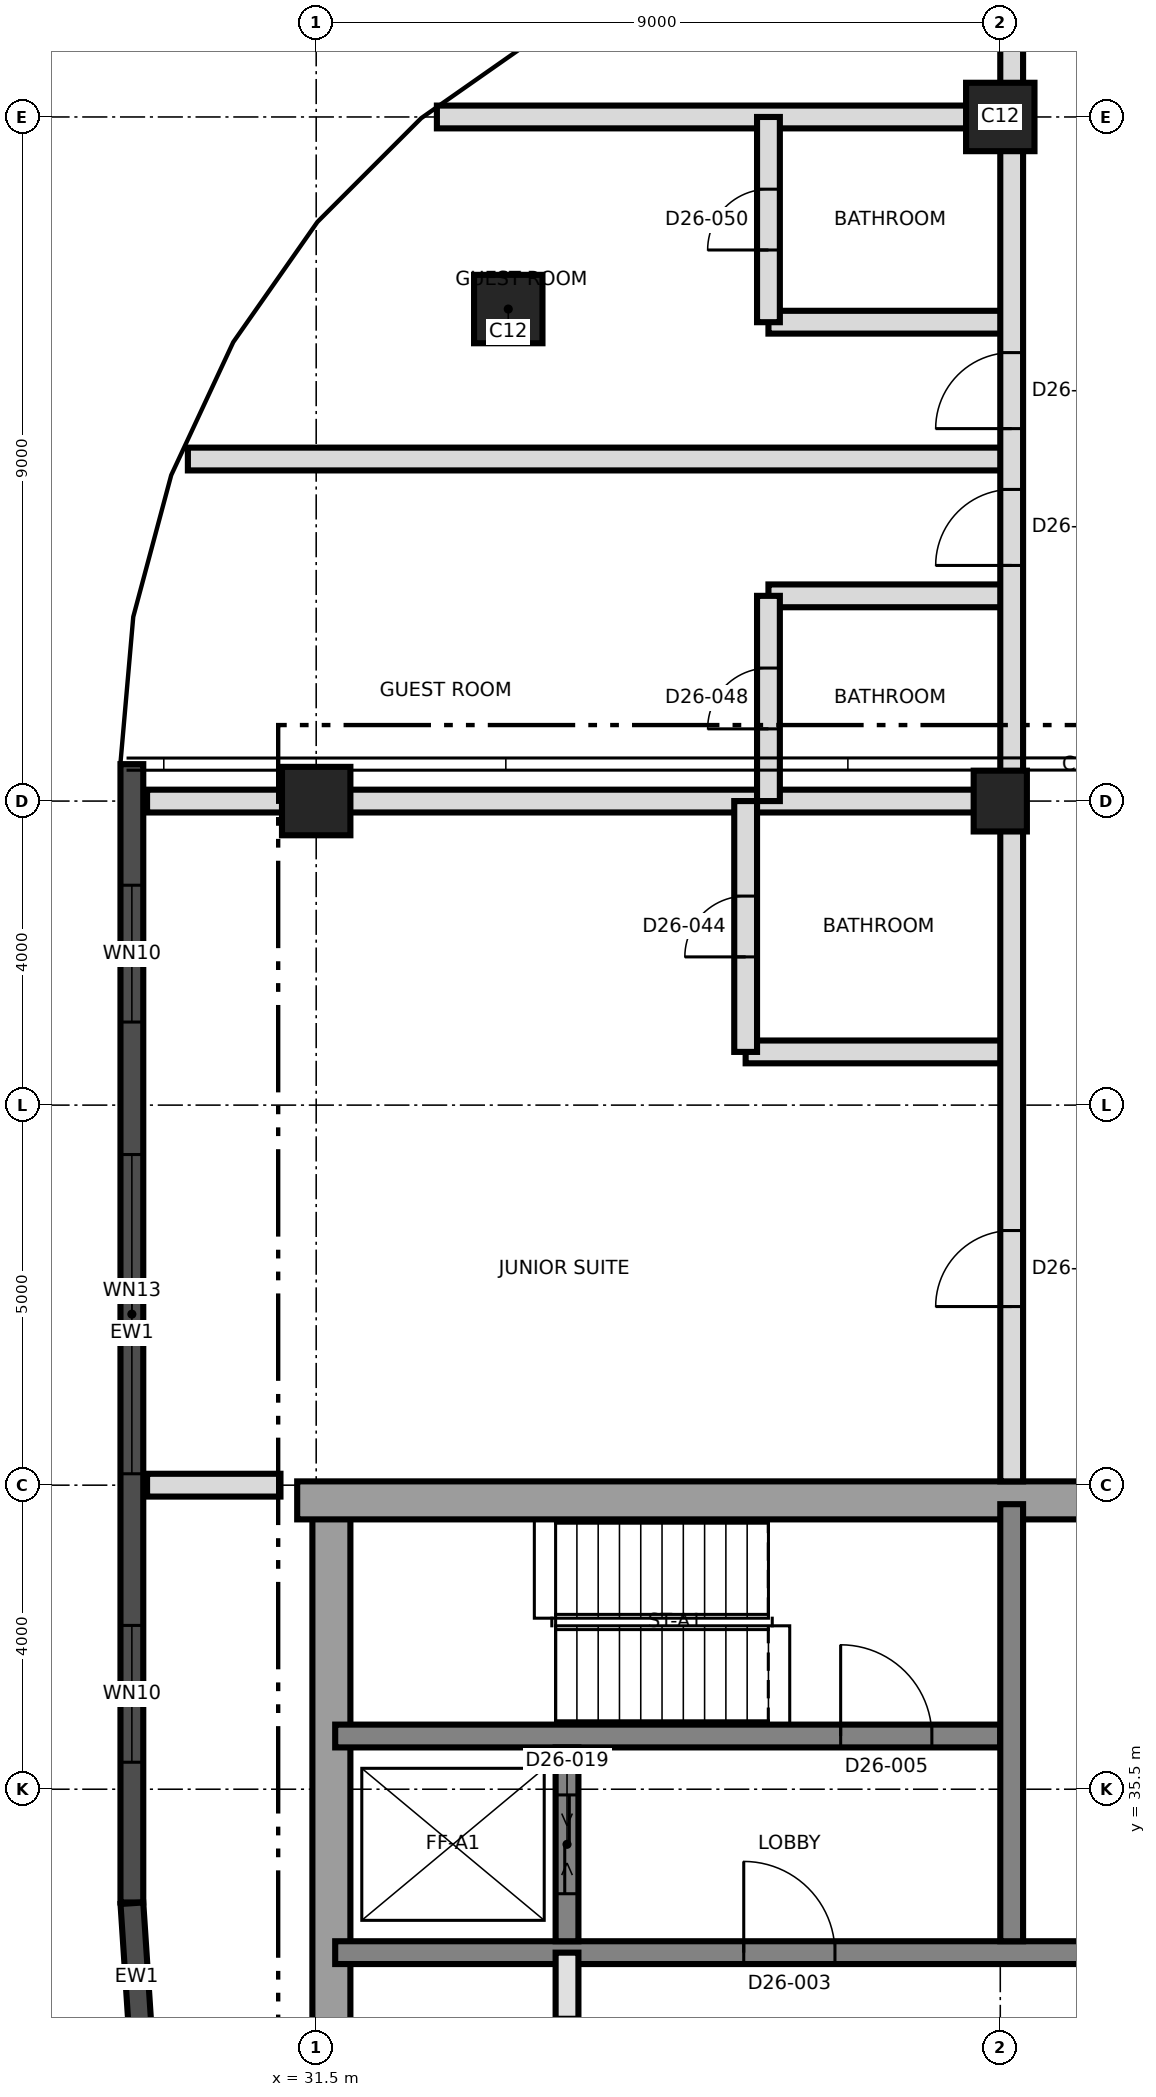
"""IFC4 building model, lengths in metres.
Left out: names, types, materials, properties, quantities, classifications, styles, units other than length and angle.
Written with IfcOpenShell. Run it as: python <this file> out.ifc"""

import sys

from ifc_helpers import new_model, si_unit, direction, frame, frame_2d, origin, origin_2d, place, context, subcontext, project, spatial, rectangle, extrude, element, fill, save


model = new_model("IFC4")
c1 = context("Model", 3, precision=1e-05, world=origin(), true_north=direction((0.0, 1.0)))
c2 = subcontext(c1, "Body", "Model", "MODEL_VIEW")
j1 = project(units=[si_unit("LENGTHUNIT", "METRE"), si_unit("PLANEANGLEUNIT", "RADIAN")], contexts=[c1])
p1 = place(None, origin())
s1 = spatial("IfcSite", under=j1, at=p1, CompositionType="ELEMENT")
p2 = place(p1, origin())
s2 = spatial("IfcBuilding", under=s1, at=p2, CompositionType="ELEMENT")
p3 = place(p2, frame((0.0, 0.0, 240.2)))
s3 = spatial("IfcBuildingStorey", under=s2, at=p3, CompositionType="ELEMENT", Elevation=240.2)
p4 = place(p3, frame((31.7, 21.75, 0.0), z_axis=(0.0, 0.0, 1.0), x_axis=(0.0, 1.0, 0.0)))
e1 = element("IfcWall", 1, at=p4, inside=s3, PredefinedType="SHEAR", context=c2, shape_type="SweptSolid", body=[
    extrude(rectangle(XDim=17.5, YDim=0.5, at=frame_2d((8.75, 0.0))), origin(), (0.0, 0.0, 1.0), 3.7),
])
p5 = place(p3, frame((31.25, 39.3, 0.0), z_axis=(0.0, 0.0, 1.0), x_axis=(1.0, 0.0, 0.0)))
e2 = element("IfcWall", 2, at=p5, inside=s3, PredefinedType="SHEAR", context=c2, shape_type="SweptSolid", body=[
    extrude(rectangle(XDim=27.0, YDim=0.5, at=frame_2d((13.5, 0.0))), origin(), (0.0, 0.0, 1.0), 3.7),
])
p6 = place(p5, frame((10.45, 0.0, 0.0)))
e3 = element("IfcOpeningElement", 3, at=p6, cuts=e2, PredefinedType="OPENING", context=c2, shape_type="SweptSolid", body=[
    extrude(rectangle(XDim=1.2, YDim=2.1, at=frame_2d((0.6, 1.05))), frame((0.0, 0.26, 0.0), z_axis=(0.0, -1.0, 0.0), x_axis=(1.0, 0.0, 0.0)), (0.0, 0.0, 1.0), 0.52),
])
p7 = place(p3, frame((31.75, 33.35, 0.0), z_axis=(0.0, 0.0, 1.0), x_axis=(1.0, 0.0, 0.0)))
e4 = element("IfcWall", 4, at=p7, inside=s3, PredefinedType="SHEAR", context=c2, shape_type="SweptSolid", body=[
    extrude(rectangle(XDim=26.5, YDim=0.3, at=frame_2d((13.25, 0.0))), origin(), (0.0, 0.0, 1.0), 3.7),
])
p8 = place(p7, frame((13.9, 0.0, 0.0)))
e5 = element("IfcOpeningElement", 5, at=p8, cuts=e4, PredefinedType="OPENING", context=c2, shape_type="SweptSolid", body=[
    extrude(rectangle(XDim=1.4, YDim=2.1, at=frame_2d((0.7, 1.05))), frame((0.0, 0.16, 0.0), z_axis=(0.0, -1.0, 0.0), x_axis=(1.0, 0.0, 0.0)), (0.0, 0.0, 1.0), 0.32),
])
p9 = place(p7, frame((5.375, 0.0, 0.0)))
e6 = element("IfcOpeningElement", 6, at=p9, cuts=e4, PredefinedType="OPENING", context=c2, shape_type="SweptSolid", body=[
    extrude(rectangle(XDim=1.2, YDim=2.1, at=frame_2d((0.6, 1.05))), frame((0.0, 0.16, 0.0), z_axis=(0.0, -1.0, 0.0), x_axis=(1.0, 0.0, 0.0)), (0.0, 0.0, 1.0), 0.32),
])
p10 = place(p7, frame((19.925, 0.0, 0.0)))
e7 = element("IfcOpeningElement", 7, at=p10, cuts=e4, PredefinedType="OPENING", context=c2, shape_type="SweptSolid", body=[
    extrude(rectangle(XDim=1.2, YDim=2.1, at=frame_2d((0.6, 1.05))), frame((0.0, 0.16, 0.0), z_axis=(0.0, -1.0, 0.0), x_axis=(1.0, 0.0, 0.0)), (0.0, 0.0, 1.0), 0.32),
])
p11 = place(p3, frame((31.75, 36.2, 0.0), z_axis=(0.0, 0.0, 1.0), x_axis=(1.0, 0.0, 0.0)))
e8 = element("IfcWall", 8, at=p11, inside=s3, PredefinedType="SHEAR", context=c2, shape_type="SweptSolid", body=[
    extrude(rectangle(XDim=8.75, YDim=0.3, at=frame_2d((4.375, 0.0))), origin(), (0.0, 0.0, 1.0), 3.7),
])
p12 = place(p11, frame((6.65, 0.0, 0.0)))
e9 = element("IfcOpeningElement", 9, at=p12, cuts=e8, PredefinedType="OPENING", context=c2, shape_type="SweptSolid", body=[
    extrude(rectangle(XDim=1.2, YDim=2.1, at=frame_2d((0.6, 1.05))), frame((0.0, 0.16, 0.0), z_axis=(0.0, -1.0, 0.0), x_axis=(1.0, 0.0, 0.0)), (0.0, 0.0, 1.0), 0.32),
])
p13 = place(p3, frame((40.65, 33.5, 0.0), z_axis=(0.0, 0.0, 1.0), x_axis=(0.0, 1.0, 0.0)))
e10 = element("IfcWall", 10, at=p13, inside=s3, PredefinedType="SHEAR", context=c2, shape_type="SweptSolid", body=[
    extrude(rectangle(XDim=5.75, YDim=0.3, at=frame_2d((2.875, 0.0))), origin(), (0.0, 0.0, 1.0), 3.7),
])
p14 = place(p3, frame((34.8, 33.5, 0.0), z_axis=(0.0, 0.0, 1.0), x_axis=(0.0, 1.0, 0.0)))
e11 = element("IfcWall", 11, at=p14, inside=s3, PredefinedType="SHEAR", context=c2, shape_type="SweptSolid", body=[
    extrude(rectangle(XDim=2.55, YDim=0.3, at=frame_2d((1.275, 0.0))), origin(), (0.0, 0.0, 1.0), 3.7),
])
p15 = place(p14, frame((0.625, 0.0, 0.0)))
e12 = element("IfcOpeningElement", 12, at=p15, cuts=e11, PredefinedType="OPENING", context=c2, shape_type="SweptSolid", body=[
    extrude(rectangle(XDim=1.3, YDim=2.4, at=frame_2d((0.65, 1.2))), frame((0.0, 0.16, 0.0), z_axis=(0.0, -1.0, 0.0), x_axis=(1.0, 0.0, 0.0)), (0.0, 0.0, 1.0), 0.32),
])
p16 = place(p3, frame((31.5, 48.5, 0.0), z_axis=(0.0, 0.0, 1.0), x_axis=(1.0, 0.0, 0.0)))
e13 = element("IfcColumn", 13, at=p16, inside=s3, PredefinedType="COLUMN", context=c2, shape_type="SweptSolid", body=[
    extrude(rectangle(XDim=0.9, YDim=0.9, at=origin_2d()), origin(), (0.0, 0.0, 1.0), 3.7),
])
p17 = place(p3, frame((40.5, 48.5, 0.0), z_axis=(0.0, 0.0, 1.0), x_axis=(0.0, 1.0, 0.0)))
e14 = element("IfcColumn", 14, at=p17, inside=s3, PredefinedType="COLUMN", context=c2, shape_type="SweptSolid", body=[
    extrude(rectangle(XDim=0.8, YDim=0.7, at=origin_2d()), origin(), (0.0, 0.0, 1.0), 3.7),
])
for number, where, z_axis, x_axis in (
    (15, (34.027, 54.973, 0.0), (0.0, 0.0, 1.0), (1.0, 0.0, 0.0)),
    (16, (40.5, 57.5, 0.0), (0.0, 0.0, 1.0), (1.0, 0.0, 0.0)),
):
    element("IfcColumn", number, at=place(p3, frame(where, z_axis=z_axis, x_axis=x_axis)), inside=s3, PredefinedType="COLUMN", context=c2, shape_type="SweptSolid", body=[
        extrude(rectangle(XDim=0.9, YDim=0.9, at=origin_2d()), origin(), (0.0, 0.0, 1.0), 3.7),
    ])
p18 = place(p3, frame((29.075, 48.986, 0.0), z_axis=(0.0, 0.0, 1.0), x_axis=(0.0, -1.0, 0.0)))
e17 = element("IfcWall", 17, at=p18, inside=s3, PredefinedType="SOLIDWALL", context=c2, shape_type="SweptSolid", body=[
    extrude(rectangle(XDim=14.976, YDim=0.3, at=frame_2d((7.488, 0.0))), origin(), (0.0, 0.0, 1.0), 3.4),
])
p19 = place(p18, frame((1.593, 0.0, 0.3)))
e18 = element("IfcOpeningElement", 18, at=p19, cuts=e17, PredefinedType="OPENING", context=c2, shape_type="SweptSolid", body=[
    extrude(rectangle(XDim=1.8, YDim=2.4, at=frame_2d((0.9, 1.2))), frame((0.0, 0.16, 0.0), z_axis=(0.0, -1.0, 0.0), x_axis=(1.0, 0.0, 0.0)), (0.0, 0.0, 1.0), 0.32),
])
p20 = place(p18, frame((5.136, 0.0, 0.9)))
e19 = element("IfcOpeningElement", 19, at=p20, cuts=e17, PredefinedType="OPENING", context=c2, shape_type="SweptSolid", body=[
    extrude(rectangle(XDim=4.2, YDim=1.7, at=frame_2d((2.1, 0.85))), frame((0.0, 0.16, 0.0), z_axis=(0.0, -1.0, 0.0), x_axis=(1.0, 0.0, 0.0)), (0.0, 0.0, 1.0), 0.32),
])
p21 = place(p18, frame((11.331, 0.0, 0.3)))
e20 = element("IfcOpeningElement", 20, at=p21, cuts=e17, PredefinedType="OPENING", context=c2, shape_type="SweptSolid", body=[
    extrude(rectangle(XDim=1.8, YDim=2.4, at=frame_2d((0.9, 1.2))), frame((0.0, 0.16, 0.0), z_axis=(0.0, -1.0, 0.0), x_axis=(1.0, 0.0, 0.0)), (0.0, 0.0, 1.0), 0.32),
])
p22 = place(p3, frame((29.075, 34.0, 0.0), z_axis=(0.0, 0.0, 1.0), x_axis=(0.065359381612, -0.997861789646, 0.0)))
e21 = element("IfcWall", 21, at=p22, inside=s3, PredefinedType="SOLIDWALL", context=c2, shape_type="SweptSolid", body=[
    extrude(rectangle(XDim=1.942, YDim=0.3, at=frame_2d((0.971, 0.0))), origin(), (0.0, 0.0, 1.0), 3.4),
])
p23 = place(p3, frame((34.8, 30.65, 0.0), z_axis=(0.0, 0.0, 1.0), x_axis=(0.0, 1.0, 0.0)))
e22 = element("IfcWall", 22, at=p23, inside=s3, PredefinedType="SOLIDWALL", context=c2, shape_type="SweptSolid", body=[
    extrude(rectangle(XDim=2.7, YDim=0.3, at=frame_2d((1.35, 0.0))), origin(), (0.0, 0.0, 1.0), 3.4),
])
p24 = place(p23, frame((0.85, 0.0, 0.0)))
e23 = element("IfcOpeningElement", 23, at=p24, cuts=e22, PredefinedType="OPENING", context=c2, shape_type="SweptSolid", body=[
    extrude(rectangle(XDim=1.0, YDim=2.1, at=frame_2d((0.5, 1.05))), frame((0.0, 0.16, 0.0), z_axis=(0.0, -1.0, 0.0), x_axis=(1.0, 0.0, 0.0)), (0.0, 0.0, 1.0), 0.32),
])
p25 = place(p3, frame((29.275, 39.5, 0.0), z_axis=(0.0, 0.0, 1.0), x_axis=(1.0, 0.0, 0.0)))
e24 = element("IfcWall", 24, at=p25, inside=s3, PredefinedType="PARTITIONING", context=c2, shape_type="SweptSolid", body=[
    extrude(rectangle(XDim=1.755, YDim=0.3, at=frame_2d((0.877, 0.0))), origin(), (0.0, 0.0, 1.0), 3.35),
])
p26 = place(p3, frame((37.15, 45.2, 0.0), z_axis=(0.0, 0.0, 1.0), x_axis=(1.0, 0.0, 0.0)))
e25 = element("IfcWall", 25, at=p26, inside=s3, PredefinedType="PARTITIONING", context=c2, shape_type="SweptSolid", body=[
    extrude(rectangle(XDim=3.5, YDim=0.3, at=frame_2d((1.75, 0.0))), origin(), (0.0, 0.0, 1.0), 3.4),
])
p27 = place(p3, frame((29.275, 48.5, 0.0), z_axis=(0.0, 0.0, 1.0), x_axis=(1.0, 0.0, 0.0)))
e26 = element("IfcWall", 26, at=p27, inside=s3, PredefinedType="PARTITIONING", context=c2, shape_type="SweptSolid", body=[
    extrude(rectangle(XDim=11.375, YDim=0.3, at=frame_2d((5.688, 0.0))), origin(), (0.0, 0.0, 1.0), 3.35),
])
p28 = place(p3, frame((37.45, 51.2, 0.0), z_axis=(0.0, 0.0, 1.0), x_axis=(1.0, 0.0, 0.0)))
e27 = element("IfcWall", 27, at=p28, inside=s3, PredefinedType="PARTITIONING", context=c2, shape_type="SweptSolid", body=[
    extrude(rectangle(XDim=3.2, YDim=0.3, at=frame_2d((1.6, 0.0))), origin(), (0.0, 0.0, 1.0), 3.4),
])
p29 = place(p3, frame((29.812, 53.0, 0.0), z_axis=(0.0, 0.0, 1.0), x_axis=(1.0, 0.0, 0.0)))
e28 = element("IfcWall", 28, at=p29, inside=s3, PredefinedType="PARTITIONING", context=c2, shape_type="SweptSolid", body=[
    extrude(rectangle(XDim=10.838, YDim=0.3, at=frame_2d((5.419, 0.0))), origin(), (0.0, 0.0, 1.0), 3.35),
])
p30 = place(p3, frame((37.45, 54.8, 0.0), z_axis=(0.0, 0.0, 1.0), x_axis=(1.0, 0.0, 0.0)))
e29 = element("IfcWall", 29, at=p30, inside=s3, PredefinedType="PARTITIONING", context=c2, shape_type="SweptSolid", body=[
    extrude(rectangle(XDim=3.2, YDim=0.3, at=frame_2d((1.6, 0.0))), origin(), (0.0, 0.0, 1.0), 3.4),
])
p31 = place(p3, frame((33.088, 57.5, 0.0), z_axis=(0.0, 0.0, 1.0), x_axis=(1.0, 0.0, 0.0)))
e30 = element("IfcWall", 30, at=p31, inside=s3, PredefinedType="PARTITIONING", context=c2, shape_type="SweptSolid", body=[
    extrude(rectangle(XDim=7.562, YDim=0.3, at=frame_2d((3.781, 0.0))), origin(), (0.0, 0.0, 1.0), 3.35),
])
p32 = place(p3, frame((37.15, 45.2, 0.0), z_axis=(0.0, 0.0, 1.0), x_axis=(0.0, 1.0, 0.0)))
e31 = element("IfcWall", 31, at=p32, inside=s3, PredefinedType="PARTITIONING", context=c2, shape_type="SweptSolid", body=[
    extrude(rectangle(XDim=3.3, YDim=0.3, at=frame_2d((1.65, 0.0))), origin(), (0.0, 0.0, 1.0), 3.4),
])
p33 = place(p32, frame((1.25, 0.0, 0.0)))
e32 = element("IfcOpeningElement", 32, at=p33, cuts=e31, PredefinedType="OPENING", context=c2, shape_type="SweptSolid", body=[
    extrude(rectangle(XDim=0.8, YDim=2.1, at=frame_2d((0.4, 1.05))), frame((0.0, 0.16, 0.0), z_axis=(0.0, -1.0, 0.0), x_axis=(1.0, 0.0, 0.0)), (0.0, 0.0, 1.0), 0.32),
])
p34 = place(p3, frame((37.45, 48.5, 0.0), z_axis=(0.0, 0.0, 1.0), x_axis=(0.0, 1.0, 0.0)))
e33 = element("IfcWall", 33, at=p34, inside=s3, PredefinedType="PARTITIONING", context=c2, shape_type="SweptSolid", body=[
    extrude(rectangle(XDim=2.7, YDim=0.3, at=frame_2d((1.35, 0.0))), origin(), (0.0, 0.0, 1.0), 3.4),
])
p35 = place(p34, frame((0.95, 0.0, 0.0)))
e34 = element("IfcOpeningElement", 34, at=p35, cuts=e33, PredefinedType="OPENING", context=c2, shape_type="SweptSolid", body=[
    extrude(rectangle(XDim=0.8, YDim=2.1, at=frame_2d((0.4, 1.05))), frame((0.0, 0.16, 0.0), z_axis=(0.0, -1.0, 0.0), x_axis=(1.0, 0.0, 0.0)), (0.0, 0.0, 1.0), 0.32),
])
p36 = place(p3, frame((37.45, 54.8, 0.0), z_axis=(0.0, 0.0, 1.0), x_axis=(0.0, 1.0, 0.0)))
e35 = element("IfcWall", 35, at=p36, inside=s3, PredefinedType="PARTITIONING", context=c2, shape_type="SweptSolid", body=[
    extrude(rectangle(XDim=2.7, YDim=0.3, at=frame_2d((1.35, 0.0))), origin(), (0.0, 0.0, 1.0), 3.4),
])
p37 = place(p36, frame((0.95, 0.0, 0.0)))
e36 = element("IfcOpeningElement", 36, at=p37, cuts=e35, PredefinedType="OPENING", context=c2, shape_type="SweptSolid", body=[
    extrude(rectangle(XDim=0.8, YDim=2.1, at=frame_2d((0.4, 1.05))), frame((0.0, 0.16, 0.0), z_axis=(0.0, -1.0, 0.0), x_axis=(1.0, 0.0, 0.0)), (0.0, 0.0, 1.0), 0.32),
])
p38 = place(p3, frame((40.65, 39.55, 0.0), z_axis=(0.0, 0.0, 1.0), x_axis=(0.0, 1.0, 0.0)))
e37 = element("IfcWall", 37, at=p38, inside=s3, PredefinedType="PARTITIONING", context=c2, shape_type="SweptSolid", body=[
    extrude(rectangle(XDim=19.0, YDim=0.3, at=frame_2d((9.5, 0.0))), origin(), (0.0, 0.0, 1.0), 3.4),
])
p39 = place(p38, frame((2.3, 0.0, 0.0)))
e38 = element("IfcOpeningElement", 38, at=p39, cuts=e37, PredefinedType="OPENING", context=c2, shape_type="SweptSolid", body=[
    extrude(rectangle(XDim=1.0, YDim=2.4, at=frame_2d((0.5, 1.2))), frame((0.0, 0.16, 0.0), z_axis=(0.0, -1.0, 0.0), x_axis=(1.0, 0.0, 0.0)), (0.0, 0.0, 1.0), 0.32),
])
p40 = place(p38, frame((12.05, 0.0, 0.0)))
e39 = element("IfcOpeningElement", 39, at=p40, cuts=e37, PredefinedType="OPENING", context=c2, shape_type="SweptSolid", body=[
    extrude(rectangle(XDim=1.0, YDim=2.1, at=frame_2d((0.5, 1.05))), frame((0.0, 0.16, 0.0), z_axis=(0.0, -1.0, 0.0), x_axis=(1.0, 0.0, 0.0)), (0.0, 0.0, 1.0), 0.32),
])
p41 = place(p38, frame((13.85, 0.0, 0.0)))
e40 = element("IfcOpeningElement", 40, at=p41, cuts=e37, PredefinedType="OPENING", context=c2, shape_type="SweptSolid", body=[
    extrude(rectangle(XDim=1.0, YDim=2.1, at=frame_2d((0.5, 1.05))), frame((0.0, 0.16, 0.0), z_axis=(0.0, -1.0, 0.0), x_axis=(1.0, 0.0, 0.0)), (0.0, 0.0, 1.0), 0.32),
])
p42 = place(p19, origin())
e41 = element("IfcWindow", 41, at=p42, inside=s3, PartitioningType="SINGLE_PANEL", PredefinedType="WINDOW", context=c2, shape_type="SweptSolid", body=[
    extrude(rectangle(XDim=1.8, YDim=2.4, at=frame_2d((0.9, 1.2))), frame((0.0, 0.03, 0.0), z_axis=(0.0, -1.0, 0.0), x_axis=(1.0, 0.0, 0.0)), (0.0, 0.0, 1.0), 0.06),
])
fill(e18, e41)
p43 = place(p20, origin())
e42 = element("IfcWindow", 42, at=p43, inside=s3, PartitioningType="SINGLE_PANEL", PredefinedType="WINDOW", context=c2, shape_type="SweptSolid", body=[
    extrude(rectangle(XDim=4.2, YDim=1.7, at=frame_2d((2.1, 0.85))), frame((0.0, 0.03, 0.0), z_axis=(0.0, -1.0, 0.0), x_axis=(1.0, 0.0, 0.0)), (0.0, 0.0, 1.0), 0.06),
])
fill(e19, e42)
p44 = place(p21, origin())
e43 = element("IfcWindow", 43, at=p44, inside=s3, PartitioningType="SINGLE_PANEL", PredefinedType="WINDOW", context=c2, shape_type="SweptSolid", body=[
    extrude(rectangle(XDim=1.8, YDim=2.4, at=frame_2d((0.9, 1.2))), frame((0.0, 0.03, 0.0), z_axis=(0.0, -1.0, 0.0), x_axis=(1.0, 0.0, 0.0)), (0.0, 0.0, 1.0), 0.06),
])
fill(e20, e43)
p45 = place(p9, origin())
e44 = element("IfcDoor", 44, at=p45, inside=s3, OperationType="SINGLE_SWING_LEFT", PredefinedType="DOOR", context=c2, shape_type="SweptSolid", body=[
    extrude(rectangle(XDim=1.2, YDim=2.1, at=frame_2d((0.6, 1.05))), frame((0.0, 0.025, 0.0), z_axis=(0.0, -1.0, 0.0), x_axis=(1.0, 0.0, 0.0)), (0.0, 0.0, 1.0), 0.05),
])
fill(e6, e44)
p46 = place(p12, origin())
e45 = element("IfcDoor", 45, at=p46, inside=s3, OperationType="SINGLE_SWING_RIGHT", PredefinedType="DOOR", context=c2, shape_type="SweptSolid", body=[
    extrude(rectangle(XDim=1.2, YDim=2.1, at=frame_2d((0.6, 1.05))), frame((0.0, 0.025, 0.0), z_axis=(0.0, -1.0, 0.0), x_axis=(1.0, 0.0, 0.0)), (0.0, 0.0, 1.0), 0.05),
])
fill(e9, e45)
p47 = place(p15, origin())
e46 = element("IfcDoor", 46, at=p47, inside=s3, OperationType="SLIDING_TO_LEFT", PredefinedType="DOOR", context=c2, shape_type="SweptSolid", body=[
    extrude(rectangle(XDim=1.3, YDim=2.4, at=frame_2d((0.65, 1.2))), frame((0.0, 0.025, 0.0), z_axis=(0.0, -1.0, 0.0), x_axis=(1.0, 0.0, 0.0)), (0.0, 0.0, 1.0), 0.05),
])
fill(e12, e46)
p48 = place(p33, origin())
e47 = element("IfcDoor", 47, at=p48, inside=s3, OperationType="SINGLE_SWING_LEFT", PredefinedType="DOOR", context=c2, shape_type="SweptSolid", body=[
    extrude(rectangle(XDim=0.8, YDim=2.1, at=frame_2d((0.4, 1.05))), frame((0.0, 0.025, 0.0), z_axis=(0.0, -1.0, 0.0), x_axis=(1.0, 0.0, 0.0)), (0.0, 0.0, 1.0), 0.05),
])
fill(e32, e47)
p49 = place(p39, origin())
e48 = element("IfcDoor", 48, at=p49, inside=s3, OperationType="SINGLE_SWING_LEFT", PredefinedType="DOOR", context=c2, shape_type="SweptSolid", body=[
    extrude(rectangle(XDim=1.0, YDim=2.4, at=frame_2d((0.5, 1.2))), frame((0.0, 0.025, 0.0), z_axis=(0.0, -1.0, 0.0), x_axis=(1.0, 0.0, 0.0)), (0.0, 0.0, 1.0), 0.05),
])
fill(e38, e48)
p50 = place(p35, origin())
e49 = element("IfcDoor", 49, at=p50, inside=s3, OperationType="SINGLE_SWING_RIGHT", PredefinedType="DOOR", context=c2, shape_type="SweptSolid", body=[
    extrude(rectangle(XDim=0.8, YDim=2.1, at=frame_2d((0.4, 1.05))), frame((0.0, 0.025, 0.0), z_axis=(0.0, -1.0, 0.0), x_axis=(1.0, 0.0, 0.0)), (0.0, 0.0, 1.0), 0.05),
])
fill(e34, e49)
p51 = place(p40, origin())
e50 = element("IfcDoor", 50, at=p51, inside=s3, OperationType="SINGLE_SWING_LEFT", PredefinedType="DOOR", context=c2, shape_type="SweptSolid", body=[
    extrude(rectangle(XDim=1.0, YDim=2.1, at=frame_2d((0.5, 1.05))), frame((0.0, 0.025, 0.0), z_axis=(0.0, -1.0, 0.0), x_axis=(1.0, 0.0, 0.0)), (0.0, 0.0, 1.0), 0.05),
])
fill(e39, e50)
p52 = place(p37, origin())
e51 = element("IfcDoor", 51, at=p52, inside=s3, OperationType="SINGLE_SWING_LEFT", PredefinedType="DOOR", context=c2, shape_type="SweptSolid", body=[
    extrude(rectangle(XDim=0.8, YDim=2.1, at=frame_2d((0.4, 1.05))), frame((0.0, 0.025, 0.0), z_axis=(0.0, -1.0, 0.0), x_axis=(1.0, 0.0, 0.0)), (0.0, 0.0, 1.0), 0.05),
])
fill(e36, e51)
p53 = place(p41, origin())
e52 = element("IfcDoor", 52, at=p53, inside=s3, OperationType="SINGLE_SWING_LEFT", PredefinedType="DOOR", context=c2, shape_type="SweptSolid", body=[
    extrude(rectangle(XDim=1.0, YDim=2.1, at=frame_2d((0.5, 1.05))), frame((0.0, 0.025, 0.0), z_axis=(0.0, -1.0, 0.0), x_axis=(1.0, 0.0, 0.0)), (0.0, 0.0, 1.0), 0.05),
])
fill(e40, e52)
save(model, sys.argv[1])
